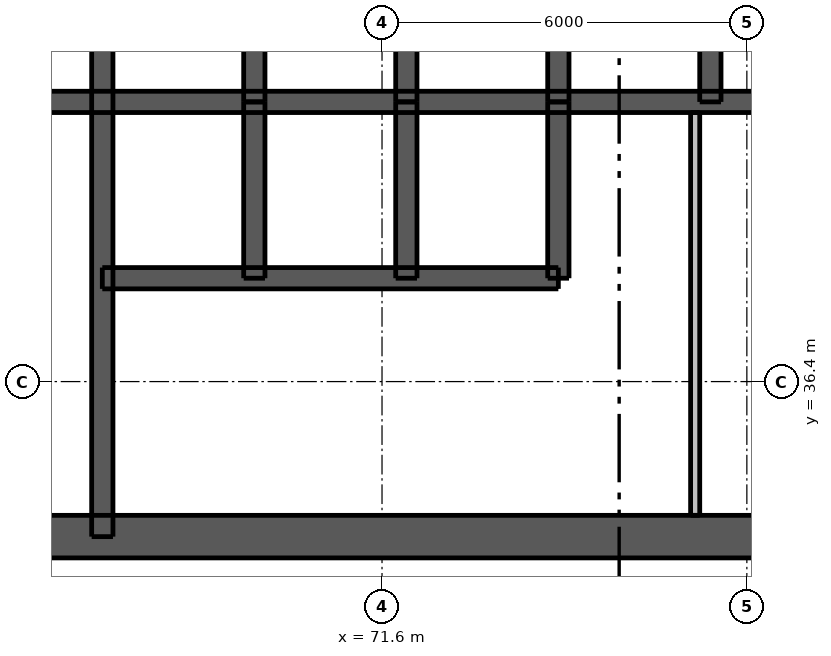
"""IFC4 building model, lengths in metres.
Left out: names, types, materials, properties, quantities, classifications, styles, units other than length and angle.
Written with IfcOpenShell. Run it as: python <this file> out.ifc"""

import sys

from ifc_helpers import new_model, si_unit, direction, frame, frame_2d, origin, place, context, subcontext, project, spatial, rectangle, extrude, element, fill, save


model = new_model("IFC4")
c1 = context("Model", 3, precision=1e-05, world=origin(), true_north=direction((0.0, 1.0)))
c2 = subcontext(c1, "Body", "Model", "MODEL_VIEW")
j1 = project(units=[si_unit("LENGTHUNIT", "METRE"), si_unit("PLANEANGLEUNIT", "RADIAN")], contexts=[c1])
p1 = place(None, origin())
s1 = spatial("IfcSite", under=j1, at=p1, CompositionType="ELEMENT")
p2 = place(p1, origin())
s2 = spatial("IfcBuilding", under=s1, at=p2, CompositionType="ELEMENT")
p3 = place(p2, frame((0.0, 0.0, 147.1)))
s3 = spatial("IfcBuildingStorey", under=s2, at=p3, CompositionType="ELEMENT", Elevation=147.1)
p4 = place(p3, frame((62.5, 33.85, 0.0), z_axis=(0.0, 0.0, 1.0), x_axis=(1.0, 0.0, 0.0)))
e1 = element("IfcWall", 1, at=p4, inside=s3, PredefinedType="SHEAR", context=c2, shape_type="SweptSolid", body=[
    extrude(rectangle(XDim=24.0, YDim=0.7, at=frame_2d((12.0, 0.0))), origin(), (0.0, 0.0, 1.0), 3.0),
])
p5 = place(p4, frame((1.962, 0.0, 0.0)))
e2 = element("IfcOpeningElement", 2, at=p5, cuts=e1, PredefinedType="OPENING", context=c2, shape_type="SweptSolid", body=[
    extrude(rectangle(XDim=1.1, YDim=2.1, at=frame_2d((0.55, 1.05))), frame((0.0, 0.36, 0.0), z_axis=(0.0, -1.0, 0.0), x_axis=(1.0, 0.0, 0.0)), (0.0, 0.0, 1.0), 0.72),
])
p6 = place(p4, frame((20.938, 0.0, 0.0)))
e3 = element("IfcOpeningElement", 3, at=p6, cuts=e1, PredefinedType="OPENING", context=c2, shape_type="SweptSolid", body=[
    extrude(rectangle(XDim=1.1, YDim=2.1, at=frame_2d((0.55, 1.05))), frame((0.0, 0.36, 0.0), z_axis=(0.0, -1.0, 0.0), x_axis=(1.0, 0.0, 0.0)), (0.0, 0.0, 1.0), 0.72),
])
p7 = place(p4, frame((8.0, 0.0, 0.0)))
e4 = element("IfcOpeningElement", 4, at=p7, cuts=e1, PredefinedType="OPENING", context=c2, shape_type="SweptSolid", body=[
    extrude(rectangle(XDim=1.1, YDim=2.1, at=frame_2d((0.55, 1.05))), frame((0.0, 0.36, 0.0), z_axis=(0.0, -1.0, 0.0), x_axis=(1.0, 0.0, 0.0)), (0.0, 0.0, 1.0), 0.72),
])
p8 = place(p4, frame((16.375, 0.0, 0.0)))
e5 = element("IfcOpeningElement", 5, at=p8, cuts=e1, PredefinedType="OPENING", context=c2, shape_type="SweptSolid", body=[
    extrude(rectangle(XDim=0.9, YDim=2.1, at=frame_2d((0.45, 1.05))), frame((0.0, 0.36, 0.0), z_axis=(0.0, -1.0, 0.0), x_axis=(1.0, 0.0, 0.0)), (0.0, 0.0, 1.0), 0.72),
])
p9 = place(p3, frame((62.85, 41.0, 0.0), z_axis=(0.0, 0.0, 1.0), x_axis=(1.0, 0.0, 0.0)))
e6 = element("IfcWall", 6, at=p9, inside=s3, PredefinedType="SHEAR", context=c2, shape_type="SweptSolid", body=[
    extrude(rectangle(XDim=23.3, YDim=0.35, at=frame_2d((11.65, 0.0))), origin(), (0.0, 0.0, 1.0), 3.0),
])
p10 = place(p3, frame((67.0, 33.85, 0.0), z_axis=(0.0, 0.0, 1.0), x_axis=(0.0, 1.0, 0.0)))
e7 = element("IfcWall", 7, at=p10, inside=s3, PredefinedType="SHEAR", context=c2, shape_type="SweptSolid", body=[
    extrude(rectangle(XDim=10.05, YDim=0.35, at=frame_2d((5.025, 0.0))), origin(), (0.0, 0.0, 1.0), 3.0),
])
p11 = place(p10, frame((0.55, 0.0, 0.0)))
e8 = element("IfcOpeningElement", 8, at=p11, cuts=e7, PredefinedType="OPENING", context=c2, shape_type="SweptSolid", body=[
    extrude(rectangle(XDim=1.1, YDim=2.1, at=frame_2d((0.55, 1.05))), frame((0.0, 0.185, 0.0), z_axis=(0.0, -1.0, 0.0), x_axis=(1.0, 0.0, 0.0)), (0.0, 0.0, 1.0), 0.37),
])
for number, where, z_axis, x_axis in (
    (9, (69.5, 41.0, 0.0), (0.0, 0.0, 1.0), (0.0, 1.0, 0.0)),
    (10, (72.0, 41.0, 0.0), (0.0, 0.0, 1.0), (0.0, 1.0, 0.0)),
    (11, (74.5, 41.0, 0.0), (0.0, 0.0, 1.0), (0.0, 1.0, 0.0)),
    (12, (77.0, 41.0, 0.0), (0.0, 0.0, 1.0), (0.0, 1.0, 0.0)),
):
    element("IfcWall", number, at=place(p3, frame(where, z_axis=z_axis, x_axis=x_axis)), inside=s3, PredefinedType="SHEAR", context=c2, shape_type="SweptSolid", body=[
        extrude(rectangle(XDim=2.9, YDim=0.35, at=frame_2d((1.45, 0.0))), origin(), (0.0, 0.0, 1.0), 3.0),
    ])
p12 = place(p3, frame((67.0, 38.1, 0.0), z_axis=(0.0, 0.0, 1.0), x_axis=(1.0, 0.0, 0.0)))
e13 = element("IfcWall", 13, at=p12, inside=s3, PredefinedType="SHEAR", context=c2, shape_type="SweptSolid", body=[
    extrude(rectangle(XDim=7.5, YDim=0.35, at=frame_2d((3.75, 0.0))), origin(), (0.0, 0.0, 1.0), 3.0),
])
p13 = place(p12, frame((0.7, 0.0, 0.0)))
e14 = element("IfcOpeningElement", 14, at=p13, cuts=e13, PredefinedType="OPENING", context=c2, shape_type="SweptSolid", body=[
    extrude(rectangle(XDim=1.1, YDim=2.1, at=frame_2d((0.55, 1.05))), frame((0.0, 0.185, 0.0), z_axis=(0.0, -1.0, 0.0), x_axis=(1.0, 0.0, 0.0)), (0.0, 0.0, 1.0), 0.37),
])
p14 = place(p12, frame((3.2, 0.0, 0.0)))
e15 = element("IfcOpeningElement", 15, at=p14, cuts=e13, PredefinedType="OPENING", context=c2, shape_type="SweptSolid", body=[
    extrude(rectangle(XDim=1.1, YDim=2.1, at=frame_2d((0.55, 1.05))), frame((0.0, 0.185, 0.0), z_axis=(0.0, -1.0, 0.0), x_axis=(1.0, 0.0, 0.0)), (0.0, 0.0, 1.0), 0.37),
])
p15 = place(p12, frame((5.65, 0.0, 0.0)))
e16 = element("IfcOpeningElement", 16, at=p15, cuts=e13, PredefinedType="OPENING", context=c2, shape_type="SweptSolid", body=[
    extrude(rectangle(XDim=1.2, YDim=2.1, at=frame_2d((0.6, 1.05))), frame((0.0, 0.185, 0.0), z_axis=(0.0, -1.0, 0.0), x_axis=(1.0, 0.0, 0.0)), (0.0, 0.0, 1.0), 0.37),
])
for number, where, z_axis, x_axis in (
    (17, (69.5, 38.1, 0.0), (0.0, 0.0, 1.0), (0.0, 1.0, 0.0)),
    (18, (72.0, 38.1, 0.0), (0.0, 0.0, 1.0), (0.0, 1.0, 0.0)),
    (19, (74.5, 38.1, 0.0), (0.0, 0.0, 1.0), (0.0, 1.0, 0.0)),
):
    element("IfcWall", number, at=place(p3, frame(where, z_axis=z_axis, x_axis=x_axis)), inside=s3, PredefinedType="SHEAR", context=c2, shape_type="SweptSolid", body=[
        extrude(rectangle(XDim=2.9, YDim=0.35, at=frame_2d((1.45, 0.0))), origin(), (0.0, 0.0, 1.0), 3.0),
    ])
p16 = place(p3, frame((76.75, 34.2, 0.0), z_axis=(0.0, 0.0, 1.0), x_axis=(0.0, 1.0, 0.0)))
e20 = element("IfcWall", 20, at=p16, inside=s3, PredefinedType="PLUMBINGWALL", context=c2, shape_type="SweptSolid", body=[
    extrude(rectangle(XDim=6.625, YDim=0.15, at=frame_2d((3.312, 0.0))), origin(), (0.0, 0.0, 1.0), 3.0),
])
p17 = place(p7, origin())
e21 = element("IfcDoor", 21, at=p17, inside=s3, OperationType="SINGLE_SWING_LEFT", PredefinedType="DOOR", context=c2, shape_type="SweptSolid", body=[
    extrude(rectangle(XDim=1.1, YDim=2.1, at=frame_2d((0.55, 1.05))), frame((0.0, 0.337, 0.0), z_axis=(0.0, -1.0, 0.0), x_axis=(1.0, 0.0, 0.0)), (0.0, 0.0, 1.0), 0.05),
])
fill(e4, e21)
p18 = place(p11, origin())
e22 = element("IfcDoor", 22, at=p18, inside=s3, OperationType="SINGLE_SWING_RIGHT", PredefinedType="DOOR", context=c2, shape_type="SweptSolid", body=[
    extrude(rectangle(XDim=1.1, YDim=2.1, at=frame_2d((0.55, 1.05))), frame((0.0, -0.112, 0.0), z_axis=(0.0, -1.0, 0.0), x_axis=(1.0, 0.0, 0.0)), (0.0, 0.0, 1.0), 0.05),
])
fill(e8, e22)
p19 = place(p13, origin())
e23 = element("IfcDoor", 23, at=p19, inside=s3, OperationType="DOUBLE_DOOR_SLIDING", PredefinedType="DOOR", context=c2, shape_type="SweptSolid", body=[
    extrude(rectangle(XDim=1.1, YDim=2.1, at=frame_2d((0.55, 1.05))), frame((0.0, 0.025, 0.0), z_axis=(0.0, -1.0, 0.0), x_axis=(1.0, 0.0, 0.0)), (0.0, 0.0, 1.0), 0.05),
])
fill(e14, e23)
p20 = place(p14, origin())
e24 = element("IfcDoor", 24, at=p20, inside=s3, OperationType="DOUBLE_DOOR_SLIDING", PredefinedType="DOOR", context=c2, shape_type="SweptSolid", body=[
    extrude(rectangle(XDim=1.1, YDim=2.1, at=frame_2d((0.55, 1.05))), frame((0.0, 0.025, 0.0), z_axis=(0.0, -1.0, 0.0), x_axis=(1.0, 0.0, 0.0)), (0.0, 0.0, 1.0), 0.05),
])
fill(e15, e24)
p21 = place(p15, origin())
e25 = element("IfcDoor", 25, at=p21, inside=s3, OperationType="DOUBLE_DOOR_SLIDING", PredefinedType="DOOR", context=c2, shape_type="SweptSolid", body=[
    extrude(rectangle(XDim=1.2, YDim=2.1, at=frame_2d((0.6, 1.05))), frame((0.0, 0.025, 0.0), z_axis=(0.0, -1.0, 0.0), x_axis=(1.0, 0.0, 0.0)), (0.0, 0.0, 1.0), 0.05),
])
fill(e16, e25)
save(model, sys.argv[1])
